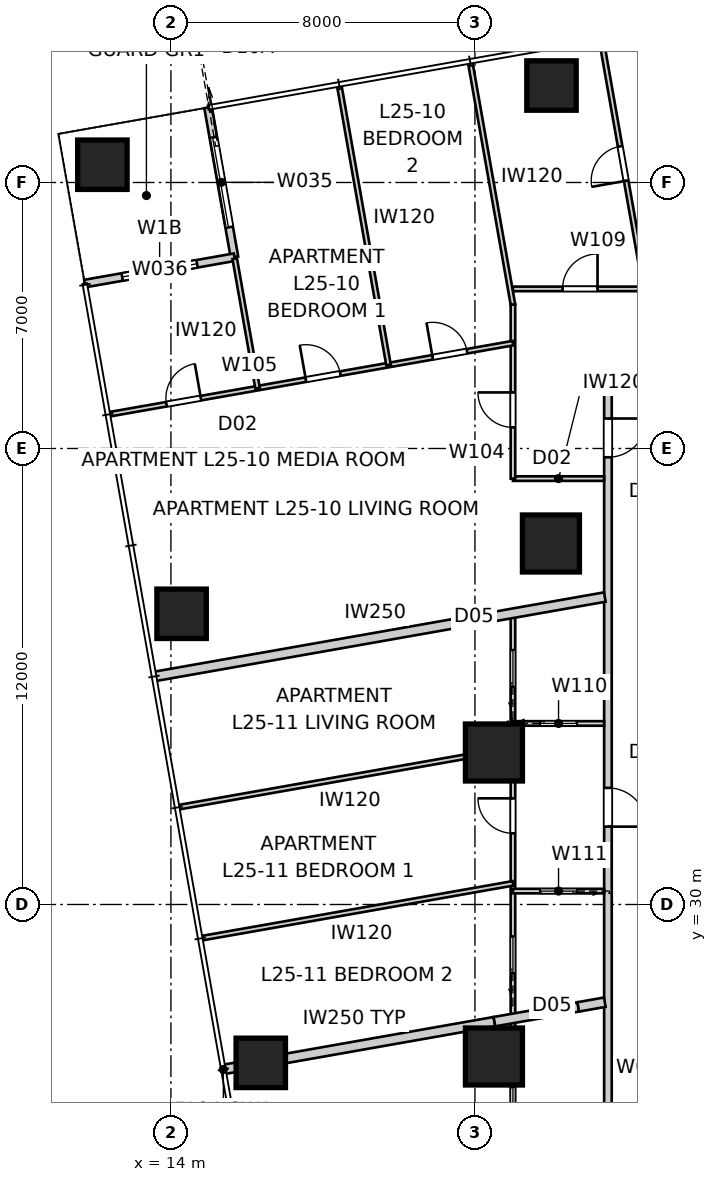
"""IFC4 building model, lengths in metres.
Left out: names, types, materials, properties, quantities, classifications, styles, units other than length and angle.
Written with IfcOpenShell. Run it as: python <this file> out.ifc"""

import sys

from ifc_helpers import new_model, si_unit, direction, frame, frame_2d, origin, origin_2d, place, context, subcontext, project, spatial, rectangle, extrude, element, fill, save


model = new_model("IFC4")
c1 = context("Model", 3, precision=1e-05, world=origin(), true_north=direction((0.0, 1.0)))
c2 = subcontext(c1, "Body", "Model", "MODEL_VIEW")
j1 = project(units=[si_unit("LENGTHUNIT", "METRE"), si_unit("PLANEANGLEUNIT", "RADIAN")], contexts=[c1])
p1 = place(None, origin())
s1 = spatial("IfcSite", under=j1, at=p1, CompositionType="ELEMENT")
p2 = place(p1, origin())
s2 = spatial("IfcBuilding", under=s1, at=p2, CompositionType="ELEMENT")
p3 = place(p2, frame((0.0, 0.0, 93.0)))
s3 = spatial("IfcBuildingStorey", under=s2, at=p3, CompositionType="ELEMENT", Elevation=93.0)
for number, where, z_axis, x_axis in (
    (1, (24.015, 51.552, 0.0), (0.0, 0.0, 1.0), (1.0, 0.0, 0.0)),
    (2, (12.197, 49.468, 0.0), (0.0, 0.0, 1.0), (1.0, 0.0, 0.0)),
    (3, (14.281, 37.65, 0.0), (0.0, 0.0, 1.0), (1.0, 0.0, 0.0)),
    (4, (16.365, 25.833, 0.0), (0.0, 0.0, 1.0), (1.0, 0.0, 0.0)),
):
    element("IfcColumn", number, at=place(p3, frame(where, z_axis=z_axis, x_axis=x_axis)), inside=s3, PredefinedType="COLUMN", context=c2, shape_type="SweptSolid", body=[
        extrude(rectangle(XDim=1.3, YDim=1.3, at=origin_2d()), origin(), (0.0, 0.0, 1.0), 3.4),
    ])
for number, where, z_axis, x_axis in (
    (5, (24.0, 39.5, 0.0), (0.0, 0.0, 1.0), (1.0, 0.0, 0.0)),
    (6, (22.5, 34.0, 0.0), (0.0, 0.0, 1.0), (1.0, 0.0, 0.0)),
    (7, (22.5, 26.0, 0.0), (0.0, 0.0, 1.0), (1.0, 0.0, 0.0)),
):
    element("IfcColumn", number, at=place(p3, frame(where, z_axis=z_axis, x_axis=x_axis)), inside=s3, PredefinedType="COLUMN", context=c2, shape_type="SweptSolid", body=[
        extrude(rectangle(XDim=1.5, YDim=1.5, at=origin_2d()), origin(), (0.0, 0.0, 1.0), 3.4),
    ])
p4 = place(p3, frame((14.978, 50.974, 0.0), z_axis=(0.0, 0.0, 1.0), x_axis=(0.173646056486, -0.984808127031, 0.0)))
e8 = element("IfcWall", 8, at=p4, inside=s3, PredefinedType="SOLIDWALL", context=c2, shape_type="SweptSolid", body=[
    extrude(rectangle(XDim=4.0, YDim=0.2, at=frame_2d((2.0, 0.0))), origin(), (0.0, 0.0, 1.0), 3.25),
])
p5 = place(p4, frame((0.8, 0.0, 0.0)))
e9 = element("IfcOpeningElement", 9, at=p5, cuts=e8, PredefinedType="OPENING", context=c2, shape_type="SweptSolid", body=[
    extrude(rectangle(XDim=2.4, YDim=2.1, at=frame_2d((1.2, 1.05))), frame((0.0, 0.11, 0.0), z_axis=(0.0, -1.0, 0.0), x_axis=(1.0, 0.0, 0.0)), (0.0, 0.0, 1.0), 0.22),
])
p6 = place(p3, frame((15.672, 47.034, 0.0), z_axis=(0.0, 0.0, 1.0), x_axis=(-0.984808127031, -0.173646056486, 0.0)))
e10 = element("IfcWall", 10, at=p6, inside=s3, PredefinedType="SOLIDWALL", context=c2, shape_type="SweptSolid", body=[
    extrude(rectangle(XDim=4.0, YDim=0.2, at=frame_2d((2.0, 0.0))), origin(), (0.0, 0.0, 1.0), 3.25),
])
p7 = place(p6, frame((1.0, 0.0, 0.45)))
e11 = element("IfcOpeningElement", 11, at=p7, cuts=e10, PredefinedType="OPENING", context=c2, shape_type="SweptSolid", body=[
    extrude(rectangle(XDim=2.0, YDim=1.8, at=frame_2d((1.0, 0.9))), frame((0.0, 0.11, 0.0), z_axis=(0.0, -1.0, 0.0), x_axis=(1.0, 0.0, 0.0)), (0.0, 0.0, 1.0), 0.22),
])
p8 = place(p3, frame((54.5, 43.7, 0.0), z_axis=(0.0, 0.0, 1.0), x_axis=(-1.0, 0.0, 0.0)))
e12 = element("IfcWall", 12, at=p8, inside=s3, PredefinedType="PARTITIONING", context=c2, shape_type="SweptSolid", body=[
    extrude(rectangle(XDim=29.0, YDim=0.2, at=frame_2d((14.5, 0.0))), origin(), (0.0, 0.0, 1.0), 3.25),
])
p9 = place(p8, frame((11.951, 0.0, 0.0)))
e13 = element("IfcOpeningElement", 13, at=p9, cuts=e12, PredefinedType="OPENING", context=c2, shape_type="SweptSolid", body=[
    extrude(rectangle(XDim=1.02, YDim=2.34, at=frame_2d((0.51, 1.17))), frame((0.0, 0.11, 0.0), z_axis=(0.0, -1.0, 0.0), x_axis=(1.0, 0.0, 0.0)), (0.0, 0.0, 1.0), 0.22),
])
p10 = place(p8, frame((4.795, 0.0, 0.0)))
e14 = element("IfcOpeningElement", 14, at=p10, cuts=e12, PredefinedType="OPENING", context=c2, shape_type="SweptSolid", body=[
    extrude(rectangle(XDim=1.02, YDim=2.34, at=frame_2d((0.51, 1.17))), frame((0.0, 0.11, 0.0), z_axis=(0.0, -1.0, 0.0), x_axis=(1.0, 0.0, 0.0)), (0.0, 0.0, 1.0), 0.22),
])
p11 = place(p3, frame((25.5, 43.7, 0.0), z_axis=(0.0, 0.0, 1.0), x_axis=(0.0, -1.0, 0.0)))
e15 = element("IfcWall", 15, at=p11, inside=s3, PredefinedType="PARTITIONING", context=c2, shape_type="SweptSolid", body=[
    extrude(rectangle(XDim=27.4, YDim=0.2, at=frame_2d((13.7, 0.0))), origin(), (0.0, 0.0, 1.0), 3.25),
])
p12 = place(p11, frame((24.333, 0.0, 0.0)))
e16 = element("IfcOpeningElement", 16, at=p12, cuts=e15, PredefinedType="OPENING", context=c2, shape_type="SweptSolid", body=[
    extrude(rectangle(XDim=1.02, YDim=2.1, at=frame_2d((0.51, 1.05))), frame((0.0, 0.11, 0.0), z_axis=(0.0, -1.0, 0.0), x_axis=(1.0, 0.0, 0.0)), (0.0, 0.0, 1.0), 0.22),
])
p13 = place(p11, frame((10.631, 0.0, 0.0)))
e17 = element("IfcOpeningElement", 17, at=p13, cuts=e15, PredefinedType="OPENING", context=c2, shape_type="SweptSolid", body=[
    extrude(rectangle(XDim=1.02, YDim=2.34, at=frame_2d((0.51, 1.17))), frame((0.0, 0.11, 0.0), z_axis=(0.0, -1.0, 0.0), x_axis=(1.0, 0.0, 0.0)), (0.0, 0.0, 1.0), 0.22),
])
p14 = place(p11, frame((0.911, 0.0, 0.0)))
e18 = element("IfcOpeningElement", 18, at=p14, cuts=e15, PredefinedType="OPENING", context=c2, shape_type="SweptSolid", body=[
    extrude(rectangle(XDim=1.02, YDim=2.34, at=frame_2d((0.51, 1.17))), frame((0.0, 0.11, 0.0), z_axis=(0.0, -1.0, 0.0), x_axis=(1.0, 0.0, 0.0)), (0.0, 0.0, 1.0), 0.22),
])
p15 = place(p3, frame((15.38, 25.659, 0.0), z_axis=(0.0, 0.0, 1.0), x_axis=(0.984802553948, 0.173677660443, 0.0)))
e19 = element("IfcWall", 19, at=p15, inside=s3, PredefinedType="PARTITIONING", context=c2, shape_type="SweptSolid", body=[
    extrude(rectangle(XDim=7.244, YDim=0.25, at=frame_2d((3.622, 0.0))), origin(), (0.0, 0.0, 1.0), 3.25),
])
p16 = place(p3, frame((22.513, 26.917, 0.0), z_axis=(0.0, 0.0, 1.0), x_axis=(0.984809882944, 0.17363609779, 0.0)))
e20 = element("IfcWall", 20, at=p16, inside=s3, PredefinedType="PARTITIONING", context=c2, shape_type="SweptSolid", body=[
    extrude(rectangle(XDim=2.24, YDim=0.25, at=frame_2d((1.12, 0.0))), origin(), (0.0, 0.0, 1.0), 2.795),
])
p17 = place(p3, frame((24.719, 27.306, 0.0), z_axis=(0.0, 0.0, 1.0), x_axis=(0.984835495461, 0.173490768861, 0.0)))
e21 = element("IfcWall", 21, at=p17, inside=s3, PredefinedType="PARTITIONING", context=c2, shape_type="SweptSolid", body=[
    extrude(rectangle(XDim=0.709, YDim=0.25, at=frame_2d((0.354, 0.0))), origin(), (0.0, 0.0, 1.0), 3.25),
])
p18 = place(p3, frame((13.556, 35.999, 0.0), z_axis=(0.0, 0.0, 1.0), x_axis=(0.984806609184, 0.173654664517, 0.0)))
e22 = element("IfcWall", 22, at=p18, inside=s3, PredefinedType="PARTITIONING", context=c2, shape_type="SweptSolid", body=[
    extrude(rectangle(XDim=12.044, YDim=0.25, at=frame_2d((6.022, 0.0))), origin(), (0.0, 0.0, 1.0), 3.25),
])
p19 = place(p3, frame((23.0, 22.0, 0.0), z_axis=(0.0, 0.0, 1.0), x_axis=(0.0, 1.0, 0.0)))
e23 = element("IfcWall", 23, at=p19, inside=s3, PredefinedType="PARTITIONING", context=c2, shape_type="SweptSolid", body=[
    extrude(rectangle(XDim=15.664, YDim=0.12, at=frame_2d((7.832, 0.0))), origin(), (0.0, 0.0, 1.0), 2.55),
])
p20 = place(p19, frame((9.874, 0.0, 0.0)))
e24 = element("IfcOpeningElement", 24, at=p20, cuts=e23, PredefinedType="OPENING", context=c2, shape_type="SweptSolid", body=[
    extrude(rectangle(XDim=0.92, YDim=2.34, at=frame_2d((0.46, 1.17))), frame((0.0, 0.07, 0.0), z_axis=(0.0, -1.0, 0.0), x_axis=(1.0, 0.0, 0.0)), (0.0, 0.0, 1.0), 0.14),
])
p21 = place(p19, frame((13.734, 0.0, 0.0)))
e25 = element("IfcOpeningElement", 25, at=p21, cuts=e23, PredefinedType="OPENING", context=c2, shape_type="SweptSolid", body=[
    extrude(rectangle(XDim=0.96, YDim=2.1, at=frame_2d((0.48, 1.05))), frame((0.0, 0.07, 0.0), z_axis=(0.0, -1.0, 0.0), x_axis=(1.0, 0.0, 0.0)), (0.0, 0.0, 1.0), 0.14),
])
p22 = place(p19, frame((6.198, 0.0, 0.0)))
e26 = element("IfcOpeningElement", 26, at=p22, cuts=e23, PredefinedType="OPENING", context=c2, shape_type="SweptSolid", body=[
    extrude(rectangle(XDim=0.96, YDim=2.1, at=frame_2d((0.48, 1.05))), frame((0.0, 0.07, 0.0), z_axis=(0.0, -1.0, 0.0), x_axis=(1.0, 0.0, 0.0)), (0.0, 0.0, 1.0), 0.14),
])
p23 = place(p19, frame((2.231, 0.0, 0.0)))
e27 = element("IfcOpeningElement", 27, at=p23, cuts=e23, PredefinedType="OPENING", context=c2, shape_type="SweptSolid", body=[
    extrude(rectangle(XDim=0.96, YDim=2.1, at=frame_2d((0.48, 1.05))), frame((0.0, 0.07, 0.0), z_axis=(0.0, -1.0, 0.0), x_axis=(1.0, 0.0, 0.0)), (0.0, 0.0, 1.0), 0.14),
])
p24 = place(p3, frame((23.0, 46.2, 0.0), z_axis=(0.0, 0.0, 1.0), x_axis=(1.0, 0.0, 0.0)))
e28 = element("IfcWall", 28, at=p24, inside=s3, PredefinedType="PARTITIONING", context=c2, shape_type="SweptSolid", body=[
    extrude(rectangle(XDim=34.0, YDim=0.12, at=frame_2d((17.0, 0.0))), origin(), (0.0, 0.0, 1.0), 2.55),
])
p25 = place(p24, frame((18.989, 0.0, 0.0)))
e29 = element("IfcOpeningElement", 29, at=p25, cuts=e28, PredefinedType="OPENING", context=c2, shape_type="SweptSolid", body=[
    extrude(rectangle(XDim=0.92, YDim=2.34, at=frame_2d((0.46, 1.17))), frame((0.0, 0.07, 0.0), z_axis=(0.0, -1.0, 0.0), x_axis=(1.0, 0.0, 0.0)), (0.0, 0.0, 1.0), 0.14),
])
p26 = place(p24, frame((1.306, 0.0, 0.0)))
e30 = element("IfcOpeningElement", 30, at=p26, cuts=e28, PredefinedType="OPENING", context=c2, shape_type="SweptSolid", body=[
    extrude(rectangle(XDim=0.92, YDim=2.34, at=frame_2d((0.46, 1.17))), frame((0.0, 0.07, 0.0), z_axis=(0.0, -1.0, 0.0), x_axis=(1.0, 0.0, 0.0)), (0.0, 0.0, 1.0), 0.14),
])
p27 = place(p24, frame((13.884, 0.0, 0.0)))
e31 = element("IfcOpeningElement", 31, at=p27, cuts=e28, PredefinedType="OPENING", context=c2, shape_type="SweptSolid", body=[
    extrude(rectangle(XDim=0.96, YDim=2.1, at=frame_2d((0.48, 1.05))), frame((0.0, 0.07, 0.0), z_axis=(0.0, -1.0, 0.0), x_axis=(1.0, 0.0, 0.0)), (0.0, 0.0, 1.0), 0.14),
])
p28 = place(p24, frame((21.929, 0.0, 0.0)))
e32 = element("IfcOpeningElement", 32, at=p28, cuts=e28, PredefinedType="OPENING", context=c2, shape_type="SweptSolid", body=[
    extrude(rectangle(XDim=0.96, YDim=2.1, at=frame_2d((0.48, 1.05))), frame((0.0, 0.07, 0.0), z_axis=(0.0, -1.0, 0.0), x_axis=(1.0, 0.0, 0.0)), (0.0, 0.0, 1.0), 0.14),
])
p29 = place(p3, frame((25.4, 41.208, 0.0), z_axis=(0.0, 0.0, 1.0), x_axis=(-1.0, 0.0, 0.0)))
e33 = element("IfcWall", 33, at=p29, inside=s3, PredefinedType="PARTITIONING", context=c2, shape_type="SweptSolid", body=[
    extrude(rectangle(XDim=2.4, YDim=0.12, at=frame_2d((1.2, 0.0))), origin(), (0.0, 0.0, 1.0), 2.638),
])
p30 = place(p3, frame((23.0, 41.208, 0.0), z_axis=(0.0, 0.0, 1.0), x_axis=(0.0, 1.0, 0.0)))
e34 = element("IfcWall", 34, at=p30, inside=s3, PredefinedType="PARTITIONING", context=c2, shape_type="SweptSolid", body=[
    extrude(rectangle(XDim=4.581, YDim=0.12, at=frame_2d((2.291, 0.0))), origin(), (0.0, 0.0, 1.0), 2.638),
])
p31 = place(p30, frame((1.348, 0.0, 0.0)))
e35 = element("IfcOpeningElement", 35, at=p31, cuts=e34, PredefinedType="OPENING", context=c2, shape_type="SweptSolid", body=[
    extrude(rectangle(XDim=0.92, YDim=2.34, at=frame_2d((0.46, 1.17))), frame((0.0, 0.07, 0.0), z_axis=(0.0, -1.0, 0.0), x_axis=(1.0, 0.0, 0.0)), (0.0, 0.0, 1.0), 0.14),
])
p32 = place(p3, frame((12.38, 42.9, 0.0), z_axis=(0.0, 0.0, 1.0), x_axis=(0.984807253583, 0.173651010046, 0.0)))
e36 = element("IfcWall", 36, at=p32, inside=s3, PredefinedType="PARTITIONING", context=c2, shape_type="SweptSolid", body=[
    extrude(rectangle(XDim=10.783, YDim=0.12, at=frame_2d((5.392, 0.0))), origin(), (0.0, 0.0, 1.0), 3.25),
])
p33 = place(p32, frame((1.525, 0.0, 0.0)))
e37 = element("IfcOpeningElement", 37, at=p33, cuts=e36, PredefinedType="OPENING", context=c2, shape_type="SweptSolid", body=[
    extrude(rectangle(XDim=0.92, YDim=2.34, at=frame_2d((0.46, 1.17))), frame((0.0, 0.07, 0.0), z_axis=(0.0, -1.0, 0.0), x_axis=(1.0, 0.0, 0.0)), (0.0, 0.0, 1.0), 0.14),
])
p34 = place(p32, frame((5.25, 0.0, 0.0)))
e38 = element("IfcOpeningElement", 38, at=p34, cuts=e36, PredefinedType="OPENING", context=c2, shape_type="SweptSolid", body=[
    extrude(rectangle(XDim=0.92, YDim=2.34, at=frame_2d((0.46, 1.17))), frame((0.0, 0.07, 0.0), z_axis=(0.0, -1.0, 0.0), x_axis=(1.0, 0.0, 0.0)), (0.0, 0.0, 1.0), 0.14),
])
p35 = place(p32, frame((8.637, 0.0, 0.0)))
e39 = element("IfcOpeningElement", 39, at=p35, cuts=e36, PredefinedType="OPENING", context=c2, shape_type="SweptSolid", body=[
    extrude(rectangle(XDim=0.92, YDim=2.34, at=frame_2d((0.46, 1.17))), frame((0.0, 0.07, 0.0), z_axis=(0.0, -1.0, 0.0), x_axis=(1.0, 0.0, 0.0)), (0.0, 0.0, 1.0), 0.14),
])
p36 = place(p3, frame((18.432, 51.542, 0.0), z_axis=(0.0, 0.0, 1.0), x_axis=(0.173647177755, -0.984807929323, 0.0)))
e40 = element("IfcWall", 40, at=p36, inside=s3, PredefinedType="PARTITIONING", context=c2, shape_type="SweptSolid", body=[
    extrude(rectangle(XDim=7.46, YDim=0.12, at=frame_2d((3.73, 0.0))), origin(), (0.0, 0.0, 1.0), 3.25),
])
p37 = place(p3, frame((16.28, 43.588, 0.0), z_axis=(0.0, 0.0, 1.0), x_axis=(-0.173660541335, 0.984805572884, 0.0)))
e41 = element("IfcWall", 41, at=p37, inside=s3, PredefinedType="PARTITIONING", context=c2, shape_type="SweptSolid", body=[
    extrude(rectangle(XDim=3.46, YDim=0.12, at=frame_2d((1.73, 0.0))), origin(), (0.0, 0.0, 1.0), 3.25),
])
p38 = place(p3, frame((21.878, 52.15, 0.0), z_axis=(0.0, 0.0, 1.0), x_axis=(0.173653792983, -0.984806762864, 0.0)))
e42 = element("IfcWall", 42, at=p38, inside=s3, PredefinedType="PARTITIONING", context=c2, shape_type="SweptSolid", body=[
    extrude(rectangle(XDim=6.459, YDim=0.12, at=frame_2d((3.229, 0.0))), origin(), (0.0, 0.0, 1.0), 2.638),
])
p39 = place(p3, frame((26.481, 46.2, 0.0), z_axis=(0.0, 0.0, 1.0), x_axis=(-0.173643103339, 0.98480864774, 0.0)))
e43 = element("IfcWall", 43, at=p39, inside=s3, PredefinedType="PARTITIONING", context=c2, shape_type="SweptSolid", body=[
    extrude(rectangle(XDim=6.659, YDim=0.12, at=frame_2d((3.329, 0.0))), origin(), (0.0, 0.0, 1.0), 3.25),
])
p40 = place(p39, frame((2.889, 0.0, 0.0)))
e44 = element("IfcOpeningElement", 44, at=p40, cuts=e43, PredefinedType="OPENING", context=c2, shape_type="SweptSolid", body=[
    extrude(rectangle(XDim=0.92, YDim=2.34, at=frame_2d((0.46, 1.17))), frame((0.0, 0.07, 0.0), z_axis=(0.0, -1.0, 0.0), x_axis=(1.0, 0.0, 0.0)), (0.0, 0.0, 1.0), 0.14),
])
p41 = place(p3, frame((23.0, 34.764, 0.0), z_axis=(0.0, 0.0, 1.0), x_axis=(1.0, 0.0, 0.0)))
e45 = element("IfcWall", 45, at=p41, inside=s3, PredefinedType="PARTITIONING", context=c2, shape_type="SweptSolid", body=[
    extrude(rectangle(XDim=2.4, YDim=0.12, at=frame_2d((1.2, 0.0))), origin(), (0.0, 0.0, 1.0), 3.25),
])
p42 = place(p41, frame((0.72, 0.0, 0.0)))
e46 = element("IfcOpeningElement", 46, at=p42, cuts=e45, PredefinedType="OPENING", context=c2, shape_type="SweptSolid", body=[
    extrude(rectangle(XDim=0.96, YDim=2.1, at=frame_2d((0.48, 1.05))), frame((0.0, 0.07, 0.0), z_axis=(0.0, -1.0, 0.0), x_axis=(1.0, 0.0, 0.0)), (0.0, 0.0, 1.0), 0.14),
])
p43 = place(p3, frame((25.4, 30.353, 0.0), z_axis=(0.0, 0.0, 1.0), x_axis=(-1.0, 0.0, 0.0)))
e47 = element("IfcWall", 47, at=p43, inside=s3, PredefinedType="PARTITIONING", context=c2, shape_type="SweptSolid", body=[
    extrude(rectangle(XDim=2.4, YDim=0.12, at=frame_2d((1.2, 0.0))), origin(), (0.0, 0.0, 1.0), 3.25),
])
p44 = place(p43, frame((0.72, 0.0, 0.0)))
e48 = element("IfcOpeningElement", 48, at=p44, cuts=e47, PredefinedType="OPENING", context=c2, shape_type="SweptSolid", body=[
    extrude(rectangle(XDim=0.96, YDim=2.1, at=frame_2d((0.48, 1.05))), frame((0.0, 0.07, 0.0), z_axis=(0.0, -1.0, 0.0), x_axis=(1.0, 0.0, 0.0)), (0.0, 0.0, 1.0), 0.14),
])
p45 = place(p3, frame((23.0, 34.11, 0.0), z_axis=(0.0, 0.0, 1.0), x_axis=(-0.984808038675, -0.173646557583, 0.0)))
e49 = element("IfcWall", 49, at=p45, inside=s3, PredefinedType="PARTITIONING", context=c2, shape_type="SweptSolid", body=[
    extrude(rectangle(XDim=8.932, YDim=0.12, at=frame_2d((4.466, 0.0))), origin(), (0.0, 0.0, 1.0), 3.25),
])
p46 = place(p3, frame((23.0, 30.556, 0.0), z_axis=(0.0, 0.0, 1.0), x_axis=(-0.984807787824, -0.173647980238, 0.0)))
e50 = element("IfcWall", 50, at=p46, inside=s3, PredefinedType="PARTITIONING", context=c2, shape_type="SweptSolid", body=[
    extrude(rectangle(XDim=8.315, YDim=0.12, at=frame_2d((4.157, 0.0))), origin(), (0.0, 0.0, 1.0), 3.25),
])
p47 = place(p5, origin())
e51 = element("IfcDoor", 51, at=p47, inside=s3, OperationType="SLIDING_TO_LEFT", PredefinedType="DOOR", context=c2, shape_type="SweptSolid", body=[
    extrude(rectangle(XDim=2.4, YDim=2.1, at=frame_2d((1.2, 1.05))), frame((0.0, 0.025, 0.0), z_axis=(0.0, -1.0, 0.0), x_axis=(1.0, 0.0, 0.0)), (0.0, 0.0, 1.0), 0.05),
])
fill(e9, e51)
p48 = place(p7, origin())
e52 = element("IfcWindow", 52, at=p48, inside=s3, PartitioningType="SINGLE_PANEL", PredefinedType="WINDOW", context=c2, shape_type="SweptSolid", body=[
    extrude(rectangle(XDim=2.0, YDim=1.8, at=frame_2d((1.0, 0.9))), frame((0.0, 0.03, 0.0), z_axis=(0.0, -1.0, 0.0), x_axis=(1.0, 0.0, 0.0)), (0.0, 0.0, 1.0), 0.06),
])
fill(e11, e52)
p49 = place(p13, origin())
e53 = element("IfcDoor", 53, at=p49, inside=s3, OperationType="SINGLE_SWING_RIGHT", PredefinedType="DOOR", context=c2, shape_type="SweptSolid", body=[
    extrude(rectangle(XDim=1.02, YDim=2.34, at=frame_2d((0.51, 1.17))), frame((0.0, 0.025, 0.0), z_axis=(0.0, -1.0, 0.0), x_axis=(1.0, 0.0, 0.0)), (0.0, 0.0, 1.0), 0.05),
])
fill(e17, e53)
p50 = place(p14, origin())
e54 = element("IfcDoor", 54, at=p50, inside=s3, OperationType="SINGLE_SWING_LEFT", PredefinedType="DOOR", context=c2, shape_type="SweptSolid", body=[
    extrude(rectangle(XDim=1.02, YDim=2.34, at=frame_2d((0.51, 1.17))), frame((0.0, 0.025, 0.0), z_axis=(0.0, -1.0, 0.0), x_axis=(1.0, 0.0, 0.0)), (0.0, 0.0, 1.0), 0.05),
])
fill(e18, e54)
p51 = place(p20, origin())
e55 = element("IfcDoor", 55, at=p51, inside=s3, OperationType="SINGLE_SWING_RIGHT", PredefinedType="DOOR", context=c2, shape_type="SweptSolid", body=[
    extrude(rectangle(XDim=0.92, YDim=2.34, at=frame_2d((0.46, 1.17))), frame((0.0, 0.025, 0.0), z_axis=(0.0, -1.0, 0.0), x_axis=(1.0, 0.0, 0.0)), (0.0, 0.0, 1.0), 0.05),
])
fill(e24, e55)
p52 = place(p42, origin())
e56 = element("IfcDoor", 56, at=p52, inside=s3, OperationType="SLIDING_TO_LEFT", PredefinedType="DOOR", context=c2, shape_type="SweptSolid", body=[
    extrude(rectangle(XDim=0.96, YDim=2.1, at=frame_2d((0.48, 1.05))), frame((0.0, 0.025, 0.0), z_axis=(0.0, -1.0, 0.0), x_axis=(1.0, 0.0, 0.0)), (0.0, 0.0, 1.0), 0.05),
])
fill(e46, e56)
p53 = place(p44, origin())
e57 = element("IfcDoor", 57, at=p53, inside=s3, OperationType="SLIDING_TO_LEFT", PredefinedType="DOOR", context=c2, shape_type="SweptSolid", body=[
    extrude(rectangle(XDim=0.96, YDim=2.1, at=frame_2d((0.48, 1.05))), frame((0.0, 0.025, 0.0), z_axis=(0.0, -1.0, 0.0), x_axis=(1.0, 0.0, 0.0)), (0.0, 0.0, 1.0), 0.05),
])
fill(e48, e57)
p54 = place(p31, origin())
e58 = element("IfcDoor", 58, at=p54, inside=s3, OperationType="SINGLE_SWING_RIGHT", PredefinedType="DOOR", context=c2, shape_type="SweptSolid", body=[
    extrude(rectangle(XDim=0.92, YDim=2.34, at=frame_2d((0.46, 1.17))), frame((0.0, 0.025, 0.0), z_axis=(0.0, -1.0, 0.0), x_axis=(1.0, 0.0, 0.0)), (0.0, 0.0, 1.0), 0.05),
])
fill(e35, e58)
p55 = place(p26, origin())
e59 = element("IfcDoor", 59, at=p55, inside=s3, OperationType="SINGLE_SWING_RIGHT", PredefinedType="DOOR", context=c2, shape_type="SweptSolid", body=[
    extrude(rectangle(XDim=0.92, YDim=2.34, at=frame_2d((0.46, 1.17))), frame((0.0, 0.025, 0.0), z_axis=(0.0, -1.0, 0.0), x_axis=(1.0, 0.0, 0.0)), (0.0, 0.0, 1.0), 0.05),
])
fill(e30, e59)
p56 = place(p21, origin())
e60 = element("IfcDoor", 60, at=p56, inside=s3, OperationType="SLIDING_TO_LEFT", PredefinedType="DOOR", context=c2, shape_type="SweptSolid", body=[
    extrude(rectangle(XDim=0.96, YDim=2.1, at=frame_2d((0.48, 1.05))), frame((0.0, 0.025, 0.0), z_axis=(0.0, -1.0, 0.0), x_axis=(1.0, 0.0, 0.0)), (0.0, 0.0, 1.0), 0.05),
])
fill(e25, e60)
p57 = place(p22, origin())
e61 = element("IfcDoor", 61, at=p57, inside=s3, OperationType="SLIDING_TO_LEFT", PredefinedType="DOOR", context=c2, shape_type="SweptSolid", body=[
    extrude(rectangle(XDim=0.96, YDim=2.1, at=frame_2d((0.48, 1.05))), frame((0.0, 0.025, 0.0), z_axis=(0.0, -1.0, 0.0), x_axis=(1.0, 0.0, 0.0)), (0.0, 0.0, 1.0), 0.05),
])
fill(e26, e61)
p58 = place(p33, origin())
e62 = element("IfcDoor", 62, at=p58, inside=s3, OperationType="SINGLE_SWING_RIGHT", PredefinedType="DOOR", context=c2, shape_type="SweptSolid", body=[
    extrude(rectangle(XDim=0.92, YDim=2.34, at=frame_2d((0.46, 1.17))), frame((0.0, 0.025, 0.0), z_axis=(0.0, -1.0, 0.0), x_axis=(1.0, 0.0, 0.0)), (0.0, 0.0, 1.0), 0.05),
])
fill(e37, e62)
p59 = place(p34, origin())
e63 = element("IfcDoor", 63, at=p59, inside=s3, OperationType="SINGLE_SWING_LEFT", PredefinedType="DOOR", context=c2, shape_type="SweptSolid", body=[
    extrude(rectangle(XDim=0.92, YDim=2.34, at=frame_2d((0.46, 1.17))), frame((0.0, 0.025, 0.0), z_axis=(0.0, -1.0, 0.0), x_axis=(1.0, 0.0, 0.0)), (0.0, 0.0, 1.0), 0.05),
])
fill(e38, e63)
p60 = place(p35, origin())
e64 = element("IfcDoor", 64, at=p60, inside=s3, OperationType="SINGLE_SWING_LEFT", PredefinedType="DOOR", context=c2, shape_type="SweptSolid", body=[
    extrude(rectangle(XDim=0.92, YDim=2.34, at=frame_2d((0.46, 1.17))), frame((0.0, 0.025, 0.0), z_axis=(0.0, -1.0, 0.0), x_axis=(1.0, 0.0, 0.0)), (0.0, 0.0, 1.0), 0.05),
])
fill(e39, e64)
p61 = place(p40, origin())
e65 = element("IfcDoor", 65, at=p61, inside=s3, OperationType="SINGLE_SWING_LEFT", PredefinedType="DOOR", context=c2, shape_type="SweptSolid", body=[
    extrude(rectangle(XDim=0.92, YDim=2.34, at=frame_2d((0.46, 1.17))), frame((0.0, 0.025, 0.0), z_axis=(0.0, -1.0, 0.0), x_axis=(1.0, 0.0, 0.0)), (0.0, 0.0, 1.0), 0.05),
])
fill(e44, e65)
p62 = place(p23, origin())
e66 = element("IfcDoor", 66, at=p62, inside=s3, OperationType="SLIDING_TO_LEFT", PredefinedType="DOOR", context=c2, shape_type="SweptSolid", body=[
    extrude(rectangle(XDim=0.96, YDim=2.1, at=frame_2d((0.48, 1.05))), frame((0.0, 0.025, 0.0), z_axis=(0.0, -1.0, 0.0), x_axis=(1.0, 0.0, 0.0)), (0.0, 0.0, 1.0), 0.05),
])
fill(e27, e66)
save(model, sys.argv[1])
